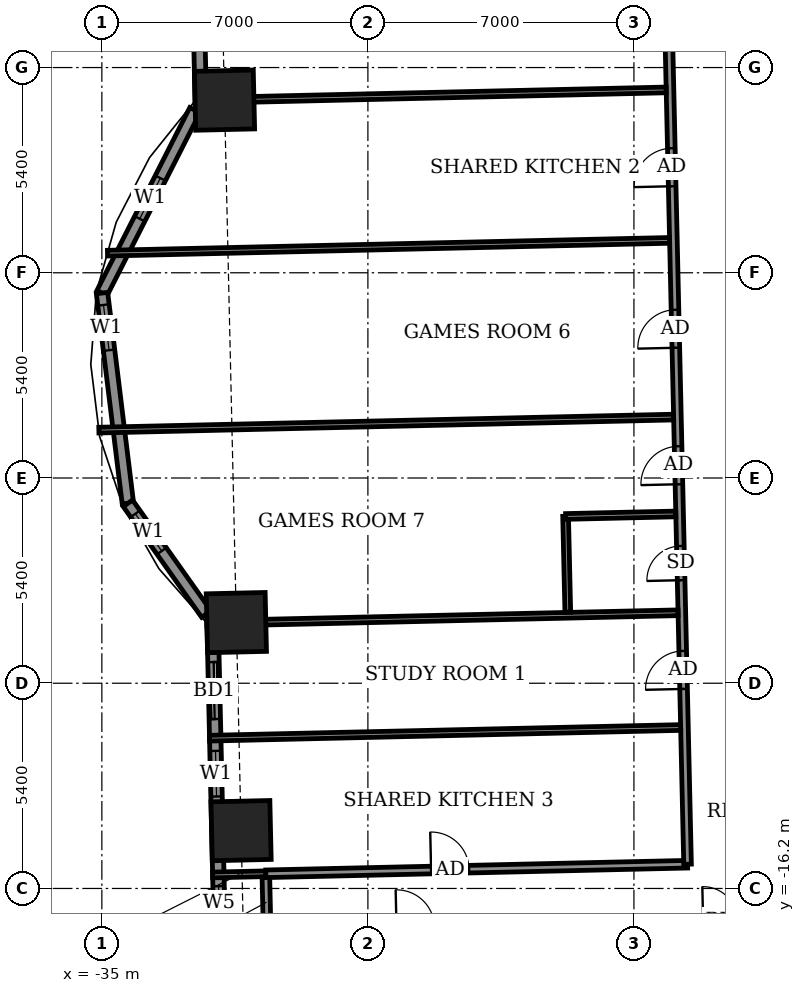
"""IFC4 building model, lengths in metres.
Left out: names, types, materials, properties, quantities, classifications, styles, units other than length and angle.
Written with IfcOpenShell. Run it as: python <this file> out.ifc"""

import sys

from ifc_helpers import new_model, si_unit, direction, frame, frame_2d, origin, origin_2d, place, context, subcontext, project, spatial, rectangle, extrude, element, fill, save


model = new_model("IFC4")
c1 = context("Model", 3, precision=1e-05, world=origin(), true_north=direction((0.0, 1.0)))
c2 = subcontext(c1, "Body", "Model", "MODEL_VIEW")
j1 = project(units=[si_unit("LENGTHUNIT", "METRE"), si_unit("PLANEANGLEUNIT", "RADIAN")], contexts=[c1])
p1 = place(None, origin())
s1 = spatial("IfcSite", under=j1, at=p1, CompositionType="ELEMENT")
p2 = place(p1, origin())
s2 = spatial("IfcBuilding", under=s1, at=p2, CompositionType="ELEMENT")
p3 = place(p2, frame((0.0, 0.0, 41.3)))
s3 = spatial("IfcBuildingStorey", under=s2, at=p3, CompositionType="ELEMENT", Elevation=41.3)
for number, where, z_axis, x_axis in (
    (1, (-31.461, -9.204, -0.55), (0.0, 0.0, 1.0), (0.023, -1.0, 0.0)),
    (2, (-31.337, -14.678, -0.55), (0.0, 0.0, 1.0), (0.023, -1.0, 0.0)),
    (3, (-31.773, 4.542, -0.55), (0.0, 0.0, 1.0), (0.023, -1.0, 0.0)),
):
    element("IfcColumn", number, at=place(p3, frame(where, z_axis=z_axis, x_axis=x_axis)), inside=s3, PredefinedType="COLUMN", context=c2, shape_type="SweptSolid", body=[
        extrude(rectangle(XDim=1.55, YDim=1.55, at=origin_2d()), origin(), (0.0, 0.0, 1.0), 3.6),
    ])
p4 = place(p3, frame((-32.758, 20.399, 0.0), z_axis=(0.0, 0.0, 1.0), x_axis=(0.022668485183, -0.999743036875, 0.0)))
e4 = element("IfcWall", 4, at=p4, inside=s3, PredefinedType="SOLIDWALL", context=c2, shape_type="SweptSolid", body=[
    extrude(rectangle(XDim=15.929, YDim=0.3, at=frame_2d((7.964, 0.0))), origin(), (0.0, 0.0, 1.0), 3.05),
])
p5 = place(p4, frame((2.183, 0.0, 0.0)))
e5 = element("IfcOpeningElement", 5, at=p5, cuts=e4, PredefinedType="OPENING", context=c2, shape_type="SweptSolid", body=[
    extrude(rectangle(XDim=1.5, YDim=2.4, at=frame_2d((0.75, 1.2))), frame((0.0, 0.16, 0.0), z_axis=(0.0, -1.0, 0.0), x_axis=(1.0, 0.0, 0.0)), (0.0, 0.0, 1.0), 0.32),
])
p6 = place(p4, frame((12.004, 0.0, 0.9)))
e6 = element("IfcOpeningElement", 6, at=p6, cuts=e4, PredefinedType="OPENING", context=c2, shape_type="SweptSolid", body=[
    extrude(rectangle(XDim=2.4, YDim=1.5, at=frame_2d((1.2, 0.75))), frame((0.0, 0.16, 0.0), z_axis=(0.0, -1.0, 0.0), x_axis=(1.0, 0.0, 0.0)), (0.0, 0.0, 1.0), 0.32),
])
p7 = place(p3, frame((-32.552, 4.28, 0.0), z_axis=(0.0, 0.0, 1.0), x_axis=(-0.452703975507, -0.891660871946, 0.0)))
e7 = element("IfcWall", 7, at=p7, inside=s3, PredefinedType="SOLIDWALL", context=c2, shape_type="SweptSolid", body=[
    extrude(rectangle(XDim=5.399, YDim=0.3, at=frame_2d((2.699, 0.0))), origin(), (0.0, 0.0, 1.0), 3.05),
])
p8 = place(p7, frame((2.007, 0.0, 0.9)))
e8 = element("IfcOpeningElement", 8, at=p8, cuts=e7, PredefinedType="OPENING", context=c2, shape_type="SweptSolid", body=[
    extrude(rectangle(XDim=1.2, YDim=1.5, at=frame_2d((0.6, 0.75))), frame((0.0, 0.16, 0.0), z_axis=(0.0, -1.0, 0.0), x_axis=(1.0, 0.0, 0.0)), (0.0, 0.0, 1.0), 0.32),
])
p9 = place(p3, frame((-34.996, -0.534, 0.0), z_axis=(0.0, 0.0, 1.0), x_axis=(0.122206978992, -0.992504636909, 0.0)))
e9 = element("IfcWall", 9, at=p9, inside=s3, PredefinedType="SOLIDWALL", context=c2, shape_type="SweptSolid", body=[
    extrude(rectangle(XDim=5.574, YDim=0.3, at=frame_2d((2.787, 0.0))), origin(), (0.0, 0.0, 1.0), 3.05),
])
p10 = place(p9, frame((0.315, 0.0, 0.9)))
e10 = element("IfcOpeningElement", 10, at=p10, cuts=e9, PredefinedType="OPENING", context=c2, shape_type="SweptSolid", body=[
    extrude(rectangle(XDim=1.2, YDim=1.5, at=frame_2d((0.6, 0.75))), frame((0.0, 0.16, 0.0), z_axis=(0.0, -1.0, 0.0), x_axis=(1.0, 0.0, 0.0)), (0.0, 0.0, 1.0), 0.32),
])
p11 = place(p3, frame((-34.315, -6.066, 0.0), z_axis=(0.0, 0.0, 1.0), x_axis=(0.578062893695, -0.815992212544, 0.0)))
e11 = element("IfcWall", 11, at=p11, inside=s3, PredefinedType="SOLIDWALL", context=c2, shape_type="SweptSolid", body=[
    extrude(rectangle(XDim=3.569, YDim=0.3, at=frame_2d((1.784, 0.0))), origin(), (0.0, 0.0, 1.0), 3.05),
])
p12 = place(p11, frame((0.338, 0.0, 0.9)))
e12 = element("IfcOpeningElement", 12, at=p12, cuts=e11, PredefinedType="OPENING", context=c2, shape_type="SweptSolid", body=[
    extrude(rectangle(XDim=1.2, YDim=1.5, at=frame_2d((0.6, 0.75))), frame((0.0, 0.16, 0.0), z_axis=(0.0, -1.0, 0.0), x_axis=(1.0, 0.0, 0.0)), (0.0, 0.0, 1.0), 0.32),
])
p13 = place(p3, frame((-32.087, -9.164, 0.0), z_axis=(0.0, 0.0, 1.0), x_axis=(0.022651102902, -0.999743430855, 0.0)))
e13 = element("IfcWall", 13, at=p13, inside=s3, PredefinedType="SOLIDWALL", context=c2, shape_type="SweptSolid", body=[
    extrude(rectangle(XDim=16.329, YDim=0.3, at=frame_2d((8.165, 0.0))), origin(), (0.0, 0.0, 1.0), 3.05),
])
p14 = place(p13, frame((1.079, 0.0, 0.0)))
e14 = element("IfcOpeningElement", 14, at=p14, cuts=e13, PredefinedType="OPENING", context=c2, shape_type="SweptSolid", body=[
    extrude(rectangle(XDim=1.5, YDim=2.4, at=frame_2d((0.75, 1.2))), frame((0.0, 0.16, 0.0), z_axis=(0.0, -1.0, 0.0), x_axis=(1.0, 0.0, 0.0)), (0.0, 0.0, 1.0), 0.32),
])
p15 = place(p13, frame((3.417, 0.0, 0.9)))
e15 = element("IfcOpeningElement", 15, at=p15, cuts=e13, PredefinedType="OPENING", context=c2, shape_type="SweptSolid", body=[
    extrude(rectangle(XDim=1.2, YDim=1.5, at=frame_2d((0.6, 0.75))), frame((0.0, 0.16, 0.0), z_axis=(0.0, -1.0, 0.0), x_axis=(1.0, 0.0, 0.0)), (0.0, 0.0, 1.0), 0.32),
])
p16 = place(p13, frame((6.979, 0.0, 0.9)))
e16 = element("IfcOpeningElement", 16, at=p16, cuts=e13, PredefinedType="OPENING", context=c2, shape_type="SweptSolid", body=[
    extrude(rectangle(XDim=0.9, YDim=1.5, at=frame_2d((0.45, 0.75))), frame((0.0, 0.16, 0.0), z_axis=(0.0, -1.0, 0.0), x_axis=(1.0, 0.0, 0.0)), (0.0, 0.0, 1.0), 0.32),
])
p17 = place(p13, frame((12.15, 0.0, 0.9)))
e17 = element("IfcOpeningElement", 17, at=p17, cuts=e13, PredefinedType="OPENING", context=c2, shape_type="SweptSolid", body=[
    extrude(rectangle(XDim=2.4, YDim=1.5, at=frame_2d((1.2, 0.75))), frame((0.0, 0.16, 0.0), z_axis=(0.0, -1.0, 0.0), x_axis=(1.0, 0.0, 0.0)), (0.0, 0.0, 1.0), 0.32),
])
p18 = place(p3, frame((-33.853, 4.746, 0.0), z_axis=(0.0, 0.0, 1.0), x_axis=(-0.02268847822, 0.999742583346, 0.0)))
e18 = element("IfcWall", 18, at=p18, inside=s3, PredefinedType="USERDEFINED", context=c2, shape_type="SweptSolid", body=[
    extrude(rectangle(XDim=3.874, YDim=0.55, at=frame_2d((1.937, 0.0))), origin(), (0.0, 0.0, 1.0), 0.8),
])
p19 = place(p3, frame((-33.351, -17.374, 0.0), z_axis=(0.0, 0.0, 1.0), x_axis=(-0.022665943652, 0.999743094499, 0.0)))
e19 = element("IfcWall", 19, at=p19, inside=s3, PredefinedType="USERDEFINED", context=c2, shape_type="SweptSolid", body=[
    extrude(rectangle(XDim=6.0, YDim=0.55, at=frame_2d((3.0, 0.0))), origin(), (0.0, 0.0, 1.0), 0.8),
])
p20 = place(p3, frame((-30.652, -17.313, 0.0), z_axis=(0.0, 0.0, 1.0), x_axis=(0.999742623764, 0.02268669719, 0.0)))
e20 = element("IfcWall", 20, at=p20, inside=s3, PredefinedType="PARTITIONING", context=c2, shape_type="SweptSolid", body=[
    extrude(rectangle(XDim=58.8, YDim=0.2, at=frame_2d((29.4, 0.0))), origin(), (0.0, 0.0, 1.0), 3.05),
])
p21 = place(p20, frame((3.406, 0.0, 0.0)))
e21 = element("IfcOpeningElement", 21, at=p21, cuts=e20, PredefinedType="OPENING", context=c2, shape_type="SweptSolid", body=[
    extrude(rectangle(XDim=1.0, YDim=2.1, at=frame_2d((0.5, 1.05))), frame((0.0, 0.11, 0.0), z_axis=(0.0, -1.0, 0.0), x_axis=(1.0, 0.0, 0.0)), (0.0, 0.0, 1.0), 0.22),
])
p22 = place(p20, frame((11.475, 0.0, 0.0)))
e22 = element("IfcOpeningElement", 22, at=p22, cuts=e20, PredefinedType="OPENING", context=c2, shape_type="SweptSolid", body=[
    extrude(rectangle(XDim=0.9, YDim=2.1, at=frame_2d((0.45, 1.05))), frame((0.0, 0.11, 0.0), z_axis=(0.0, -1.0, 0.0), x_axis=(1.0, 0.0, 0.0)), (0.0, 0.0, 1.0), 0.22),
])
p23 = place(p20, frame((13.55, 0.0, 0.0)))
e23 = element("IfcOpeningElement", 23, at=p23, cuts=e20, PredefinedType="OPENING", context=c2, shape_type="SweptSolid", body=[
    extrude(rectangle(XDim=0.9, YDim=2.1, at=frame_2d((0.45, 1.05))), frame((0.0, 0.11, 0.0), z_axis=(0.0, -1.0, 0.0), x_axis=(1.0, 0.0, 0.0)), (0.0, 0.0, 1.0), 0.22),
])
p24 = place(p20, frame((20.375, 0.0, 0.0)))
e24 = element("IfcOpeningElement", 24, at=p24, cuts=e20, PredefinedType="OPENING", context=c2, shape_type="SweptSolid", body=[
    extrude(rectangle(XDim=0.9, YDim=2.1, at=frame_2d((0.45, 1.05))), frame((0.0, 0.11, 0.0), z_axis=(0.0, -1.0, 0.0), x_axis=(1.0, 0.0, 0.0)), (0.0, 0.0, 1.0), 0.22),
])
p25 = place(p20, frame((22.625, 0.0, 0.0)))
e25 = element("IfcOpeningElement", 25, at=p25, cuts=e20, PredefinedType="OPENING", context=c2, shape_type="SweptSolid", body=[
    extrude(rectangle(XDim=0.9, YDim=2.1, at=frame_2d((0.45, 1.05))), frame((0.0, 0.11, 0.0), z_axis=(0.0, -1.0, 0.0), x_axis=(1.0, 0.0, 0.0)), (0.0, 0.0, 1.0), 0.22),
])
p26 = place(p20, frame((29.65, 0.0, 0.0)))
e26 = element("IfcOpeningElement", 26, at=p26, cuts=e20, PredefinedType="OPENING", context=c2, shape_type="SweptSolid", body=[
    extrude(rectangle(XDim=0.9, YDim=2.1, at=frame_2d((0.45, 1.05))), frame((0.0, 0.11, 0.0), z_axis=(0.0, -1.0, 0.0), x_axis=(1.0, 0.0, 0.0)), (0.0, 0.0, 1.0), 0.22),
])
p27 = place(p20, frame((31.875, 0.0, 0.0)))
e27 = element("IfcOpeningElement", 27, at=p27, cuts=e20, PredefinedType="OPENING", context=c2, shape_type="SweptSolid", body=[
    extrude(rectangle(XDim=0.9, YDim=2.1, at=frame_2d((0.45, 1.05))), frame((0.0, 0.11, 0.0), z_axis=(0.0, -1.0, 0.0), x_axis=(1.0, 0.0, 0.0)), (0.0, 0.0, 1.0), 0.22),
])
p28 = place(p20, frame((38.9, 0.0, 0.0)))
e28 = element("IfcOpeningElement", 28, at=p28, cuts=e20, PredefinedType="OPENING", context=c2, shape_type="SweptSolid", body=[
    extrude(rectangle(XDim=0.9, YDim=2.1, at=frame_2d((0.45, 1.05))), frame((0.0, 0.11, 0.0), z_axis=(0.0, -1.0, 0.0), x_axis=(1.0, 0.0, 0.0)), (0.0, 0.0, 1.0), 0.22),
])
p29 = place(p20, frame((41.025, 0.0, 0.0)))
e29 = element("IfcOpeningElement", 29, at=p29, cuts=e20, PredefinedType="OPENING", context=c2, shape_type="SweptSolid", body=[
    extrude(rectangle(XDim=0.9, YDim=2.1, at=frame_2d((0.45, 1.05))), frame((0.0, 0.11, 0.0), z_axis=(0.0, -1.0, 0.0), x_axis=(1.0, 0.0, 0.0)), (0.0, 0.0, 1.0), 0.22),
])
p30 = place(p20, frame((47.95, 0.0, 0.0)))
e30 = element("IfcOpeningElement", 30, at=p30, cuts=e20, PredefinedType="OPENING", context=c2, shape_type="SweptSolid", body=[
    extrude(rectangle(XDim=0.9, YDim=2.1, at=frame_2d((0.45, 1.05))), frame((0.0, 0.11, 0.0), z_axis=(0.0, -1.0, 0.0), x_axis=(1.0, 0.0, 0.0)), (0.0, 0.0, 1.0), 0.22),
])
p31 = place(p20, frame((55.6, 0.0, 0.0)))
e31 = element("IfcOpeningElement", 31, at=p31, cuts=e20, PredefinedType="OPENING", context=c2, shape_type="SweptSolid", body=[
    extrude(rectangle(XDim=1.0, YDim=2.1, at=frame_2d((0.5, 1.05))), frame((0.0, 0.11, 0.0), z_axis=(0.0, -1.0, 0.0), x_axis=(1.0, 0.0, 0.0)), (0.0, 0.0, 1.0), 0.22),
])
p32 = place(p20, frame((50.25, 0.0, 0.0)))
e32 = element("IfcOpeningElement", 32, at=p32, cuts=e20, PredefinedType="OPENING", context=c2, shape_type="SweptSolid", body=[
    extrude(rectangle(XDim=0.9, YDim=2.1, at=frame_2d((0.45, 1.05))), frame((0.0, 0.11, 0.0), z_axis=(0.0, -1.0, 0.0), x_axis=(1.0, 0.0, 0.0)), (0.0, 0.0, 1.0), 0.22),
])
p33 = place(p3, frame((-30.652, -17.313, 0.0), z_axis=(0.0, 0.0, 1.0), x_axis=(-0.022632637625, 0.99974384905, 0.0)))
e33 = element("IfcWall", 33, at=p33, inside=s3, PredefinedType="PARTITIONING", context=c2, shape_type="SweptSolid", body=[
    extrude(rectangle(XDim=1.5, YDim=0.2, at=frame_2d((0.75, 0.0))), origin(), (0.0, 0.0, 1.0), 3.05),
])
p34 = place(p3, frame((-32.086, -15.845, 0.0), z_axis=(0.0, 0.0, 1.0), x_axis=(0.999740667531, 0.022772739949, 0.0)))
e34 = element("IfcWall", 34, at=p34, inside=s3, PredefinedType="PARTITIONING", context=c2, shape_type="SweptSolid", body=[
    extrude(rectangle(XDim=1.404, YDim=0.15, at=frame_2d((0.702, 0.0))), origin(), (0.0, 0.0, 1.0), 2.55),
])
p35 = place(p3, frame((-30.686, -15.814, 0.0), z_axis=(0.0, 0.0, 1.0), x_axis=(0.999742346277, 0.022698921993, 0.0)))
e35 = element("IfcWall", 35, at=p35, inside=s3, PredefinedType="PARTITIONING", context=c2, shape_type="SweptSolid", body=[
    extrude(rectangle(XDim=11.1, YDim=0.2, at=frame_2d((5.55, 0.0))), origin(), (0.0, 0.0, 1.0), 3.05),
])
p36 = place(p35, frame((4.35, 0.0, 0.0)))
e36 = element("IfcOpeningElement", 36, at=p36, cuts=e35, PredefinedType="OPENING", context=c2, shape_type="SweptSolid", body=[
    extrude(rectangle(XDim=1.0, YDim=2.1, at=frame_2d((0.5, 1.05))), frame((0.0, 0.11, 0.0), z_axis=(0.0, -1.0, 0.0), x_axis=(1.0, 0.0, 0.0)), (0.0, 0.0, 1.0), 0.22),
])
p37 = place(p3, frame((-19.589, -15.562, 0.0), z_axis=(0.0, 0.0, 1.0), x_axis=(-0.02267447203, 0.999742901109, 0.0)))
e37 = element("IfcWall", 37, at=p37, inside=s3, PredefinedType="PARTITIONING", context=c2, shape_type="SweptSolid", body=[
    extrude(rectangle(XDim=27.65, YDim=0.2, at=frame_2d((13.825, 0.0))), origin(), (0.0, 0.0, 1.0), 3.05),
])
p38 = place(p37, frame((22.313, 0.0, 0.0)))
e38 = element("IfcOpeningElement", 38, at=p38, cuts=e37, PredefinedType="OPENING", context=c2, shape_type="SweptSolid", body=[
    extrude(rectangle(XDim=1.0, YDim=2.1, at=frame_2d((0.5, 1.05))), frame((0.0, 0.11, 0.0), z_axis=(0.0, -1.0, 0.0), x_axis=(1.0, 0.0, 0.0)), (0.0, 0.0, 1.0), 0.22),
])
p39 = place(p37, frame((26.0, 0.0, 0.0)))
e39 = element("IfcOpeningElement", 39, at=p39, cuts=e37, PredefinedType="OPENING", context=c2, shape_type="SweptSolid", body=[
    extrude(rectangle(XDim=0.9, YDim=2.1, at=frame_2d((0.45, 1.05))), frame((0.0, 0.11, 0.0), z_axis=(0.0, -1.0, 0.0), x_axis=(1.0, 0.0, 0.0)), (0.0, 0.0, 1.0), 0.22),
])
p40 = place(p37, frame((17.843, 0.0, 0.0)))
e40 = element("IfcOpeningElement", 40, at=p40, cuts=e37, PredefinedType="OPENING", context=c2, shape_type="SweptSolid", body=[
    extrude(rectangle(XDim=1.0, YDim=2.1, at=frame_2d((0.5, 1.05))), frame((0.0, 0.11, 0.0), z_axis=(0.0, -1.0, 0.0), x_axis=(1.0, 0.0, 0.0)), (0.0, 0.0, 1.0), 0.22),
])
p41 = place(p37, frame((13.592, 0.0, 0.0)))
e41 = element("IfcOpeningElement", 41, at=p41, cuts=e37, PredefinedType="OPENING", context=c2, shape_type="SweptSolid", body=[
    extrude(rectangle(XDim=1.0, YDim=2.1, at=frame_2d((0.5, 1.05))), frame((0.0, 0.11, 0.0), z_axis=(0.0, -1.0, 0.0), x_axis=(1.0, 0.0, 0.0)), (0.0, 0.0, 1.0), 0.22),
])
p42 = place(p37, frame((10.0, 0.0, 0.0)))
e42 = element("IfcOpeningElement", 42, at=p42, cuts=e37, PredefinedType="OPENING", context=c2, shape_type="SweptSolid", body=[
    extrude(rectangle(XDim=1.0, YDim=2.1, at=frame_2d((0.5, 1.05))), frame((0.0, 0.11, 0.0), z_axis=(0.0, -1.0, 0.0), x_axis=(1.0, 0.0, 0.0)), (0.0, 0.0, 1.0), 0.22),
])
p43 = place(p37, frame((7.475, 0.0, 0.0)))
e43 = element("IfcOpeningElement", 43, at=p43, cuts=e37, PredefinedType="OPENING", context=c2, shape_type="SweptSolid", body=[
    extrude(rectangle(XDim=0.9, YDim=2.1, at=frame_2d((0.45, 1.05))), frame((0.0, 0.11, 0.0), z_axis=(0.0, -1.0, 0.0), x_axis=(1.0, 0.0, 0.0)), (0.0, 0.0, 1.0), 0.22),
])
p44 = place(p37, frame((4.613, 0.0, 0.0)))
e44 = element("IfcOpeningElement", 44, at=p44, cuts=e37, PredefinedType="OPENING", context=c2, shape_type="SweptSolid", body=[
    extrude(rectangle(XDim=1.0, YDim=2.1, at=frame_2d((0.5, 1.05))), frame((0.0, 0.11, 0.0), z_axis=(0.0, -1.0, 0.0), x_axis=(1.0, 0.0, 0.0)), (0.0, 0.0, 1.0), 0.22),
])
p45 = place(p3, frame((-32.167, -12.246, 0.0), z_axis=(0.0, 0.0, 1.0), x_axis=(0.999743155335, 0.022663260168, 0.0)))
e45 = element("IfcWall", 45, at=p45, inside=s3, PredefinedType="PARTITIONING", context=c2, shape_type="SweptSolid", body=[
    extrude(rectangle(XDim=12.399, YDim=0.15, at=frame_2d((6.2, 0.0))), origin(), (0.0, 0.0, 1.0), 2.55),
])
p46 = place(p3, frame((-32.236, -9.227, 0.0), z_axis=(0.0, 0.0, 1.0), x_axis=(0.999743195783, 0.022661475803, 0.0)))
e46 = element("IfcWall", 46, at=p46, inside=s3, PredefinedType="PARTITIONING", context=c2, shape_type="SweptSolid", body=[
    extrude(rectangle(XDim=12.4, YDim=0.15, at=frame_2d((6.2, 0.0))), origin(), (0.0, 0.0, 1.0), 3.05),
])
p47 = place(p3, frame((-22.74, -8.931, 0.0), z_axis=(0.0, 0.0, 1.0), x_axis=(-0.023015762656, 0.999735102249, 0.0)))
e47 = element("IfcWall", 47, at=p47, inside=s3, PredefinedType="PARTITIONING", context=c2, shape_type="SweptSolid", body=[
    extrude(rectangle(XDim=2.525, YDim=0.15, at=frame_2d((1.262, 0.0))), origin(), (0.0, 0.0, 1.0), 3.05),
])
p48 = place(p3, frame((-22.797, -6.412, 0.0), z_axis=(0.0, 0.0, 1.0), x_axis=(0.999739701447, 0.022815112345, 0.0)))
e48 = element("IfcWall", 48, at=p48, inside=s3, PredefinedType="PARTITIONING", context=c2, shape_type="SweptSolid", body=[
    extrude(rectangle(XDim=2.9, YDim=0.15, at=frame_2d((1.45, 0.0))), origin(), (0.0, 0.0, 1.0), 3.05),
])
p49 = place(p3, frame((-35.079, -4.14, 0.0), z_axis=(0.0, 0.0, 1.0), x_axis=(0.999743233457, 0.022659813699, 0.0)))
e49 = element("IfcWall", 49, at=p49, inside=s3, PredefinedType="PARTITIONING", context=c2, shape_type="SweptSolid", body=[
    extrude(rectangle(XDim=15.127, YDim=0.15, at=frame_2d((7.563, 0.0))), origin(), (0.0, 0.0, 1.0), 2.05),
])
p50 = place(p3, frame((-34.852, 0.516, 0.0), z_axis=(0.0, 0.0, 1.0), x_axis=(0.999742142166, 0.022707909997, 0.0)))
e50 = element("IfcWall", 50, at=p50, inside=s3, PredefinedType="PARTITIONING", context=c2, shape_type="SweptSolid", body=[
    extrude(rectangle(XDim=14.794, YDim=0.15, at=frame_2d((7.397, 0.0))), origin(), (0.0, 0.0, 1.0), 2.05),
])
p51 = place(p3, frame((-32.248, 4.536, 0.0), z_axis=(0.0, 0.0, 1.0), x_axis=(0.999741439573, 0.022738821441, 0.0)))
e51 = element("IfcWall", 51, at=p51, inside=s3, PredefinedType="PARTITIONING", context=c2, shape_type="SweptSolid", body=[
    extrude(rectangle(XDim=12.1, YDim=0.15, at=frame_2d((6.05, 0.0))), origin(), (0.0, 0.0, 1.0), 3.05),
])
p52 = place(p8, origin())
e52 = element("IfcWindow", 52, at=p52, inside=s3, PartitioningType="SINGLE_PANEL", PredefinedType="WINDOW", context=c2, shape_type="SweptSolid", body=[
    extrude(rectangle(XDim=1.2, YDim=1.5, at=frame_2d((0.6, 0.75))), frame((0.0, 0.03, 0.0), z_axis=(0.0, -1.0, 0.0), x_axis=(1.0, 0.0, 0.0)), (0.0, 0.0, 1.0), 0.06),
])
fill(e8, e52)
p53 = place(p10, origin())
e53 = element("IfcWindow", 53, at=p53, inside=s3, PartitioningType="SINGLE_PANEL", PredefinedType="WINDOW", context=c2, shape_type="SweptSolid", body=[
    extrude(rectangle(XDim=1.2, YDim=1.5, at=frame_2d((0.6, 0.75))), frame((0.0, 0.03, 0.0), z_axis=(0.0, -1.0, 0.0), x_axis=(1.0, 0.0, 0.0)), (0.0, 0.0, 1.0), 0.06),
])
fill(e10, e53)
p54 = place(p12, origin())
e54 = element("IfcWindow", 54, at=p54, inside=s3, PartitioningType="SINGLE_PANEL", PredefinedType="WINDOW", context=c2, shape_type="SweptSolid", body=[
    extrude(rectangle(XDim=1.2, YDim=1.5, at=frame_2d((0.6, 0.75))), frame((0.0, 0.03, 0.0), z_axis=(0.0, -1.0, 0.0), x_axis=(1.0, 0.0, 0.0)), (0.0, 0.0, 1.0), 0.06),
])
fill(e12, e54)
p55 = place(p14, origin())
e55 = element("IfcDoor", 55, at=p55, inside=s3, OperationType="SLIDING_TO_LEFT", PredefinedType="DOOR", context=c2, shape_type="SweptSolid", body=[
    extrude(rectangle(XDim=1.5, YDim=2.4, at=frame_2d((0.75, 1.2))), frame((0.0, 0.025, 0.0), z_axis=(0.0, -1.0, 0.0), x_axis=(1.0, 0.0, 0.0)), (0.0, 0.0, 1.0), 0.05),
])
fill(e14, e55)
p56 = place(p15, origin())
e56 = element("IfcWindow", 56, at=p56, inside=s3, PartitioningType="SINGLE_PANEL", PredefinedType="WINDOW", context=c2, shape_type="SweptSolid", body=[
    extrude(rectangle(XDim=1.2, YDim=1.5, at=frame_2d((0.6, 0.75))), frame((0.0, 0.03, 0.0), z_axis=(0.0, -1.0, 0.0), x_axis=(1.0, 0.0, 0.0)), (0.0, 0.0, 1.0), 0.06),
])
fill(e15, e56)
p57 = place(p16, origin())
e57 = element("IfcWindow", 57, at=p57, inside=s3, PartitioningType="SINGLE_PANEL", PredefinedType="WINDOW", context=c2, shape_type="SweptSolid", body=[
    extrude(rectangle(XDim=0.9, YDim=1.5, at=frame_2d((0.45, 0.75))), frame((0.0, 0.03, 0.0), z_axis=(0.0, -1.0, 0.0), x_axis=(1.0, 0.0, 0.0)), (0.0, 0.0, 1.0), 0.06),
])
fill(e16, e57)
p58 = place(p40, origin())
e58 = element("IfcDoor", 58, at=p58, inside=s3, OperationType="SINGLE_SWING_RIGHT", PredefinedType="DOOR", context=c2, shape_type="SweptSolid", body=[
    extrude(rectangle(XDim=1.0, YDim=2.1, at=frame_2d((0.5, 1.05))), frame((0.0, 0.025, 0.0), z_axis=(0.0, -1.0, 0.0), x_axis=(1.0, 0.0, 0.0)), (0.0, 0.0, 1.0), 0.05),
])
fill(e40, e58)
p59 = place(p41, origin())
e59 = element("IfcDoor", 59, at=p59, inside=s3, OperationType="SINGLE_SWING_LEFT", PredefinedType="DOOR", context=c2, shape_type="SweptSolid", body=[
    extrude(rectangle(XDim=1.0, YDim=2.1, at=frame_2d((0.5, 1.05))), frame((0.0, 0.025, 0.0), z_axis=(0.0, -1.0, 0.0), x_axis=(1.0, 0.0, 0.0)), (0.0, 0.0, 1.0), 0.05),
])
fill(e41, e59)
p60 = place(p42, origin())
e60 = element("IfcDoor", 60, at=p60, inside=s3, OperationType="SINGLE_SWING_RIGHT", PredefinedType="DOOR", context=c2, shape_type="SweptSolid", body=[
    extrude(rectangle(XDim=1.0, YDim=2.1, at=frame_2d((0.5, 1.05))), frame((0.0, 0.025, 0.0), z_axis=(0.0, -1.0, 0.0), x_axis=(1.0, 0.0, 0.0)), (0.0, 0.0, 1.0), 0.05),
])
fill(e42, e60)
p61 = place(p43, origin())
e61 = element("IfcDoor", 61, at=p61, inside=s3, OperationType="SINGLE_SWING_LEFT", PredefinedType="DOOR", context=c2, shape_type="SweptSolid", body=[
    extrude(rectangle(XDim=0.9, YDim=2.1, at=frame_2d((0.45, 1.05))), frame((0.0, 0.025, 0.0), z_axis=(0.0, -1.0, 0.0), x_axis=(1.0, 0.0, 0.0)), (0.0, 0.0, 1.0), 0.05),
])
fill(e43, e61)
p62 = place(p44, origin())
e62 = element("IfcDoor", 62, at=p62, inside=s3, OperationType="SINGLE_SWING_LEFT", PredefinedType="DOOR", context=c2, shape_type="SweptSolid", body=[
    extrude(rectangle(XDim=1.0, YDim=2.1, at=frame_2d((0.5, 1.05))), frame((0.0, 0.025, 0.0), z_axis=(0.0, -1.0, 0.0), x_axis=(1.0, 0.0, 0.0)), (0.0, 0.0, 1.0), 0.05),
])
fill(e44, e62)
p63 = place(p36, origin())
e63 = element("IfcDoor", 63, at=p63, inside=s3, OperationType="SINGLE_SWING_RIGHT", PredefinedType="DOOR", context=c2, shape_type="SweptSolid", body=[
    extrude(rectangle(XDim=1.0, YDim=2.1, at=frame_2d((0.5, 1.05))), frame((0.0, 0.025, 0.0), z_axis=(0.0, -1.0, 0.0), x_axis=(1.0, 0.0, 0.0)), (0.0, 0.0, 1.0), 0.05),
])
fill(e36, e63)
save(model, sys.argv[1])
